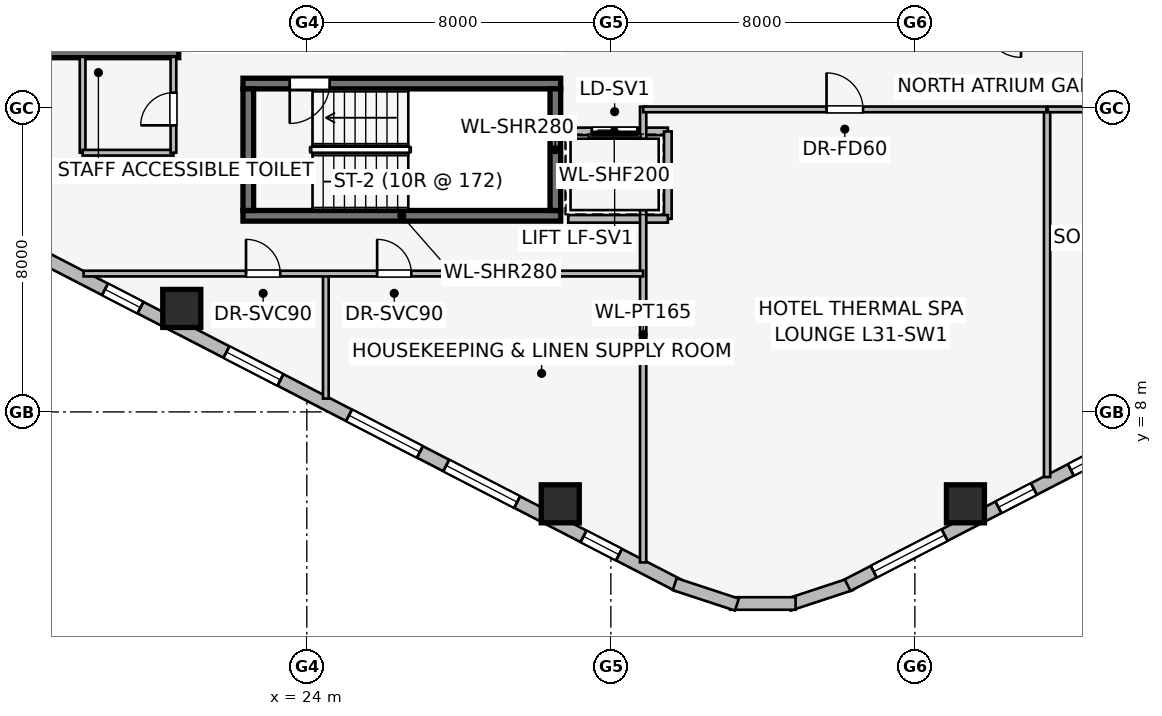
"""IFC4 building model, lengths in metres.
Left out: names, types, materials, properties, quantities, classifications, styles, units other than length and angle.
Written with IfcOpenShell. Run it as: python <this file> out.ifc"""

import sys

from ifc_helpers import new_model, si_unit, direction, frame, frame_2d, origin, origin_2d, place, context, subcontext, project, spatial, rectangle, extrude, element, fill, save


model = new_model("IFC4")
c1 = context("Model", 3, precision=1e-05, world=origin(), true_north=direction((0.0, 1.0)))
c2 = subcontext(c1, "Body", "Model", "MODEL_VIEW")
j1 = project(units=[si_unit("LENGTHUNIT", "METRE"), si_unit("PLANEANGLEUNIT", "RADIAN")], contexts=[c1])
p1 = place(None, origin())
s1 = spatial("IfcSite", under=j1, at=p1, CompositionType="ELEMENT")
p2 = place(p1, origin())
s2 = spatial("IfcBuilding", under=s1, at=p2, CompositionType="ELEMENT")
p3 = place(p2, frame((0.0, 0.0, 118.8)))
s3 = spatial("IfcBuildingStorey", under=s2, at=p3, CompositionType="ELEMENT", Elevation=118.8)
p4 = place(p3, frame((16.87, 17.46, 0.0), z_axis=(0.0, 0.0, 1.0), x_axis=(1.0, 0.0, 0.0)))
e1 = element("IfcWall", 1, at=p4, inside=s3, PredefinedType="SHEAR", context=c2, shape_type="SweptSolid", body=[
    extrude(rectangle(XDim=3.76, YDim=0.28, at=frame_2d((1.88, 0.0))), origin(), (0.0, 0.0, 1.0), 3.45),
])
p5 = place(p3, frame((22.32, 13.16, 0.0), z_axis=(0.0, 0.0, 1.0), x_axis=(1.0, 0.0, 0.0)))
e2 = element("IfcWall", 2, at=p5, inside=s3, PredefinedType="SHEAR", context=c2, shape_type="SweptSolid", body=[
    extrude(rectangle(XDim=8.36, YDim=0.28, at=frame_2d((4.18, 0.0))), origin(), (0.0, 0.0, 1.0), 3.45),
])
p6 = place(p3, frame((30.68, 16.64, 0.0), z_axis=(0.0, 0.0, 1.0), x_axis=(-1.0, 0.0, 0.0)))
e3 = element("IfcWall", 3, at=p6, inside=s3, PredefinedType="SHEAR", context=c2, shape_type="SweptSolid", body=[
    extrude(rectangle(XDim=8.36, YDim=0.28, at=frame_2d((4.18, 0.0))), origin(), (0.0, 0.0, 1.0), 3.45),
])
p7 = place(p6, frame((6.08, 0.0, 0.0)))
e4 = element("IfcOpeningElement", 4, at=p7, cuts=e3, PredefinedType="OPENING", context=c2, shape_type="SweptSolid", body=[
    extrude(rectangle(XDim=1.05, YDim=2.0, at=frame_2d((0.525, 1.0))), frame((0.0, 0.15, 0.0), z_axis=(0.0, -1.0, 0.0), x_axis=(1.0, 0.0, 0.0)), (0.0, 0.0, 1.0), 0.3),
])
for number, where, z_axis, x_axis in (
    (5, (22.46, 16.5, 0.0), (0.0, 0.0, 1.0), (0.0, -1.0, 0.0)),
    (6, (30.54, 13.3, 0.0), (0.0, 0.0, 1.0), (0.0, 1.0, 0.0)),
):
    element("IfcWall", number, at=place(p3, frame(where, z_axis=z_axis, x_axis=x_axis)), inside=s3, PredefinedType="SHEAR", context=c2, shape_type="SweptSolid", body=[
        extrude(rectangle(XDim=3.2, YDim=0.28, at=frame_2d((1.6, 0.0))), origin(), (0.0, 0.0, 1.0), 3.45),
    ])
for number, where, z_axis, x_axis in (
    (7, (20.709, 10.723, 0.0), (0.0, 0.0, 1.0), (1.0, 0.0, 0.0)),
    (8, (30.669, 5.582, 0.0), (0.0, 0.0, 1.0), (1.0, 0.0, 0.0)),
    (9, (41.331, 5.582, 0.0), (0.0, 0.0, 1.0), (1.0, 0.0, 0.0)),
):
    element("IfcColumn", number, at=place(p3, frame(where, z_axis=z_axis, x_axis=x_axis)), inside=s3, PredefinedType="COLUMN", context=c2, shape_type="SweptSolid", body=[
        extrude(rectangle(XDim=1.0, YDim=1.0, at=origin_2d()), origin(), (0.0, 0.0, 1.0), 3.45),
    ])
p8 = place(p3, frame((17.243, 11.95, 0.0), z_axis=(0.0, 0.0, 1.0), x_axis=(-0.790621329885, 0.612305408053, 0.0)))
e10 = element("IfcWall", 10, at=p8, inside=s3, PredefinedType="STANDARD", context=c2, shape_type="SweptSolid", body=[
    extrude(rectangle(XDim=1.676, YDim=0.33, at=frame_2d((0.838, 0.0))), origin(), (0.0, 0.0, 1.0), 3.19),
])
p9 = place(p3, frame((33.769, 3.442, 0.0), z_axis=(0.0, 0.0, 1.0), x_axis=(-0.888613612362, 0.458656568606, 0.0)))
e11 = element("IfcWall", 11, at=p9, inside=s3, PredefinedType="STANDARD", context=c2, shape_type="SweptSolid", body=[
    extrude(rectangle(XDim=18.681, YDim=0.34, at=frame_2d((9.34, 0.0))), origin(), (0.0, 0.0, 1.0), 3.19),
])
p10 = place(p9, frame((1.75, 0.0, 0.75)))
e12 = element("IfcOpeningElement", 12, at=p10, cuts=e11, PredefinedType="OPENING", context=c2, shape_type="SweptSolid", body=[
    extrude(rectangle(XDim=1.05, YDim=1.4, at=frame_2d((0.525, 0.7))), frame((0.0, 0.18, 0.0), z_axis=(0.0, -1.0, 0.0), x_axis=(1.0, 0.0, 0.0)), (0.0, 0.0, 1.0), 0.36),
])
p11 = place(p9, frame((4.765, 0.0, 0.75)))
e13 = element("IfcOpeningElement", 13, at=p11, cuts=e11, PredefinedType="OPENING", context=c2, shape_type="SweptSolid", body=[
    extrude(rectangle(XDim=2.1, YDim=1.5, at=frame_2d((1.05, 0.75))), frame((0.0, 0.18, 0.0), z_axis=(0.0, -1.0, 0.0), x_axis=(1.0, 0.0, 0.0)), (0.0, 0.0, 1.0), 0.36),
])
p12 = place(p9, frame((7.644, 0.0, 0.75)))
e14 = element("IfcOpeningElement", 14, at=p12, cuts=e11, PredefinedType="OPENING", context=c2, shape_type="SweptSolid", body=[
    extrude(rectangle(XDim=2.1, YDim=1.5, at=frame_2d((1.05, 0.75))), frame((0.0, 0.18, 0.0), z_axis=(0.0, -1.0, 0.0), x_axis=(1.0, 0.0, 0.0)), (0.0, 0.0, 1.0), 0.36),
])
p13 = place(p9, frame((11.774, 0.0, 0.75)))
e15 = element("IfcOpeningElement", 15, at=p13, cuts=e11, PredefinedType="OPENING", context=c2, shape_type="SweptSolid", body=[
    extrude(rectangle(XDim=1.6, YDim=1.55, at=frame_2d((0.8, 0.775))), frame((0.0, 0.18, 0.0), z_axis=(0.0, -1.0, 0.0), x_axis=(1.0, 0.0, 0.0)), (0.0, 0.0, 1.0), 0.36),
])
p14 = place(p9, frame((15.92, 0.0, 0.75)))
e16 = element("IfcOpeningElement", 16, at=p14, cuts=e11, PredefinedType="OPENING", context=c2, shape_type="SweptSolid", body=[
    extrude(rectangle(XDim=1.05, YDim=1.4, at=frame_2d((0.525, 0.7))), frame((0.0, 0.18, 0.0), z_axis=(0.0, -1.0, 0.0), x_axis=(1.0, 0.0, 0.0)), (0.0, 0.0, 1.0), 0.36),
])
for number, where, z_axis, x_axis in (
    (17, (38.319, 3.468, 0.0), (0.0, 0.0, 1.0), (-0.95, -0.312, 0.0)),
    (18, (36.861, 2.959, 0.0), (0.0, 0.0, 1.0), (-1.0, 0.0, 0.0)),
    (19, (35.317, 2.93, 0.0), (0.0, 0.0, 1.0), (-0.95, 0.312, 0.0)),
):
    element("IfcWall", number, at=place(p3, frame(where, z_axis=z_axis, x_axis=x_axis)), inside=s3, PredefinedType="STANDARD", context=c2, shape_type="SweptSolid", body=[
        extrude(rectangle(XDim=1.722, YDim=0.33, at=frame_2d((0.861, 0.0))), origin(), (0.0, 0.0, 1.0), 3.19),
    ])
p15 = place(p3, frame((54.831, 12.01, 0.0), z_axis=(0.0, 0.0, 1.0), x_axis=(-0.888613612362, -0.458656568606, 0.0)))
e20 = element("IfcWall", 20, at=p15, inside=s3, PredefinedType="STANDARD", context=c2, shape_type="SweptSolid", body=[
    extrude(rectangle(XDim=18.681, YDim=0.34, at=frame_2d((9.34, 0.0))), origin(), (0.0, 0.0, 1.0), 3.19),
])
p16 = place(p15, frame((1.023, 0.0, 0.75)))
e21 = element("IfcOpeningElement", 21, at=p16, cuts=e20, PredefinedType="OPENING", context=c2, shape_type="SweptSolid", body=[
    extrude(rectangle(XDim=1.6, YDim=1.55, at=frame_2d((0.8, 0.775))), frame((0.0, 0.18, 0.0), z_axis=(0.0, -1.0, 0.0), x_axis=(1.0, 0.0, 0.0)), (0.0, 0.0, 1.0), 0.36),
])
p17 = place(p15, frame((4.655, 0.0, 0.75)))
e22 = element("IfcOpeningElement", 22, at=p17, cuts=e20, PredefinedType="OPENING", context=c2, shape_type="SweptSolid", body=[
    extrude(rectangle(XDim=2.1, YDim=1.5, at=frame_2d((1.05, 0.75))), frame((0.0, 0.18, 0.0), z_axis=(0.0, -1.0, 0.0), x_axis=(1.0, 0.0, 0.0)), (0.0, 0.0, 1.0), 0.36),
])
p18 = place(p15, frame((7.313, 0.0, 0.75)))
e23 = element("IfcOpeningElement", 23, at=p18, cuts=e20, PredefinedType="OPENING", context=c2, shape_type="SweptSolid", body=[
    extrude(rectangle(XDim=2.1, YDim=1.5, at=frame_2d((1.05, 0.75))), frame((0.0, 0.18, 0.0), z_axis=(0.0, -1.0, 0.0), x_axis=(1.0, 0.0, 0.0)), (0.0, 0.0, 1.0), 0.36),
])
p19 = place(p15, frame((9.971, 0.0, 0.75)))
e24 = element("IfcOpeningElement", 24, at=p19, cuts=e20, PredefinedType="OPENING", context=c2, shape_type="SweptSolid", body=[
    extrude(rectangle(XDim=2.1, YDim=1.5, at=frame_2d((1.05, 0.75))), frame((0.0, 0.18, 0.0), z_axis=(0.0, -1.0, 0.0), x_axis=(1.0, 0.0, 0.0)), (0.0, 0.0, 1.0), 0.36),
])
p20 = place(p15, frame((13.165, 0.0, 0.75)))
e25 = element("IfcOpeningElement", 25, at=p20, cuts=e20, PredefinedType="OPENING", context=c2, shape_type="SweptSolid", body=[
    extrude(rectangle(XDim=1.05, YDim=1.4, at=frame_2d((0.525, 0.7))), frame((0.0, 0.18, 0.0), z_axis=(0.0, -1.0, 0.0), x_axis=(1.0, 0.0, 0.0)), (0.0, 0.0, 1.0), 0.36),
])
p21 = place(p15, frame((15.808, 0.0, 0.75)))
e26 = element("IfcOpeningElement", 26, at=p21, cuts=e20, PredefinedType="OPENING", context=c2, shape_type="SweptSolid", body=[
    extrude(rectangle(XDim=2.1, YDim=1.5, at=frame_2d((1.05, 0.75))), frame((0.0, 0.18, 0.0), z_axis=(0.0, -1.0, 0.0), x_axis=(1.0, 0.0, 0.0)), (0.0, 0.0, 1.0), 0.36),
])
p22 = place(p3, frame((33.5, 15.38, 0.0), z_axis=(0.0, 0.0, 1.0), x_axis=(-1.0, 0.0, 0.0)))
e27 = element("IfcWall", 27, at=p22, inside=s3, PredefinedType="PARTITIONING", context=c2, shape_type="SweptSolid", body=[
    extrude(rectangle(XDim=2.82, YDim=0.2, at=frame_2d((1.41, 0.0))), origin(), (0.0, 0.0, 1.0), 3.19),
])
p23 = place(p22, frame((0.8, 0.0, 0.0)))
e28 = element("IfcOpeningElement", 28, at=p23, cuts=e27, PredefinedType="OPENING", context=c2, shape_type="SweptSolid", body=[
    extrude(rectangle(XDim=1.2, YDim=2.2, at=frame_2d((0.6, 1.1))), frame((0.0, 0.11, 0.0), z_axis=(0.0, -1.0, 0.0), x_axis=(1.0, 0.0, 0.0)), (0.0, 0.0, 1.0), 0.22),
])
p24 = place(p3, frame((33.5, 13.08, 0.0), z_axis=(0.0, 0.0, 1.0), x_axis=(0.0, 1.0, 0.0)))
e29 = element("IfcWall", 29, at=p24, inside=s3, PredefinedType="PARTITIONING", context=c2, shape_type="SweptSolid", body=[
    extrude(rectangle(XDim=2.3, YDim=0.2, at=frame_2d((1.15, 0.0))), origin(), (0.0, 0.0, 1.0), 3.19),
])
p25 = place(p3, frame((30.879, 13.08, 0.0), z_axis=(0.0, 0.0, 1.0), x_axis=(1.0, 0.0, 0.0)))
e30 = element("IfcWall", 30, at=p25, inside=s3, PredefinedType="PARTITIONING", context=c2, shape_type="SweptSolid", body=[
    extrude(rectangle(XDim=2.621, YDim=0.2, at=frame_2d((1.311, 0.0))), origin(), (0.0, 0.0, 1.0), 3.19),
])
p26 = place(p3, frame((18.1, 17.34, 0.0), z_axis=(0.0, 0.0, 1.0), x_axis=(0.0, -1.0, 0.0)))
e31 = element("IfcWall", 31, at=p26, inside=s3, PredefinedType="PARTITIONING", context=c2, shape_type="SweptSolid", body=[
    extrude(rectangle(XDim=2.52, YDim=0.15, at=frame_2d((1.26, 0.0))), origin(), (0.0, 0.0, 1.0), 3.19),
])
p27 = place(p3, frame((18.1, 14.82, 0.0), z_axis=(0.0, 0.0, 1.0), x_axis=(1.0, 0.0, 0.0)))
e32 = element("IfcWall", 32, at=p27, inside=s3, PredefinedType="PARTITIONING", context=c2, shape_type="SweptSolid", body=[
    extrude(rectangle(XDim=2.39, YDim=0.15, at=frame_2d((1.195, 0.0))), origin(), (0.0, 0.0, 1.0), 3.19),
])
p28 = place(p3, frame((20.49, 14.82, 0.0), z_axis=(0.0, 0.0, 1.0), x_axis=(0.0, 1.0, 0.0)))
e33 = element("IfcWall", 33, at=p28, inside=s3, PredefinedType="PARTITIONING", context=c2, shape_type="SweptSolid", body=[
    extrude(rectangle(XDim=2.52, YDim=0.15, at=frame_2d((1.26, 0.0))), origin(), (0.0, 0.0, 1.0), 3.19),
])
p29 = place(p28, frame((0.72, 0.0, 0.0)))
e34 = element("IfcOpeningElement", 34, at=p29, cuts=e33, PredefinedType="OPENING", context=c2, shape_type="SweptSolid", body=[
    extrude(rectangle(XDim=0.86, YDim=2.0, at=frame_2d((0.43, 1.0))), frame((0.0, 0.085, 0.0), z_axis=(0.0, -1.0, 0.0), x_axis=(1.0, 0.0, 0.0)), (0.0, 0.0, 1.0), 0.17),
])
p30 = place(p3, frame((32.85, 4.04, 0.0), z_axis=(0.0, 0.0, 1.0), x_axis=(0.0, 1.0, 0.0)))
e35 = element("IfcWall", 35, at=p30, inside=s3, PredefinedType="PARTITIONING", context=c2, shape_type="SweptSolid", body=[
    extrude(rectangle(XDim=11.99, YDim=0.165, at=frame_2d((5.995, 0.0))), origin(), (0.0, 0.0, 1.0), 3.19),
])
p31 = place(p3, frame((24.5, 8.35, 0.0), z_axis=(0.0, 0.0, 1.0), x_axis=(0.0, 1.0, 0.0)))
e36 = element("IfcWall", 36, at=p31, inside=s3, PredefinedType="PARTITIONING", context=c2, shape_type="SweptSolid", body=[
    extrude(rectangle(XDim=3.29, YDim=0.15, at=frame_2d((1.645, 0.0))), origin(), (0.0, 0.0, 1.0), 3.19),
])
p32 = place(p3, frame((18.126, 11.64, 0.0), z_axis=(0.0, 0.0, 1.0), x_axis=(1.0, 0.0, 0.0)))
e37 = element("IfcWall", 37, at=p32, inside=s3, PredefinedType="PARTITIONING", context=c2, shape_type="SweptSolid", body=[
    extrude(rectangle(XDim=14.724, YDim=0.15, at=frame_2d((7.362, 0.0))), origin(), (0.0, 0.0, 1.0), 3.19),
])
p33 = place(p32, frame((4.274, 0.0, 0.0)))
e38 = element("IfcOpeningElement", 38, at=p33, cuts=e37, PredefinedType="OPENING", context=c2, shape_type="SweptSolid", body=[
    extrude(rectangle(XDim=0.9, YDim=2.0, at=frame_2d((0.45, 1.0))), frame((0.0, 0.085, 0.0), z_axis=(0.0, -1.0, 0.0), x_axis=(1.0, 0.0, 0.0)), (0.0, 0.0, 1.0), 0.17),
])
p34 = place(p32, frame((7.724, 0.0, 0.0)))
e39 = element("IfcOpeningElement", 39, at=p34, cuts=e37, PredefinedType="OPENING", context=c2, shape_type="SweptSolid", body=[
    extrude(rectangle(XDim=0.9, YDim=2.0, at=frame_2d((0.45, 1.0))), frame((0.0, 0.085, 0.0), z_axis=(0.0, -1.0, 0.0), x_axis=(1.0, 0.0, 0.0)), (0.0, 0.0, 1.0), 0.17),
])
p35 = place(p3, frame((43.479, 6.286, 0.0), z_axis=(0.0, 0.0, 1.0), x_axis=(0.0, 1.0, 0.0)))
e40 = element("IfcWall", 40, at=p35, inside=s3, PredefinedType="PARTITIONING", context=c2, shape_type="SweptSolid", body=[
    extrude(rectangle(XDim=9.644, YDim=0.165, at=frame_2d((4.822, 0.0))), origin(), (0.0, 0.0, 1.0), 3.19),
])
p36 = place(p3, frame((32.85, 15.96, 0.0), z_axis=(0.0, 0.0, 1.0), x_axis=(1.0, 0.0, 0.0)))
e41 = element("IfcWall", 41, at=p36, inside=s3, PredefinedType="PARTITIONING", context=c2, shape_type="SweptSolid", body=[
    extrude(rectangle(XDim=10.611, YDim=0.15, at=frame_2d((5.305, 0.0))), origin(), (0.0, 0.0, 1.0), 3.19),
])
p37 = place(p36, frame((4.826, 0.0, 0.0)))
e42 = element("IfcOpeningElement", 42, at=p37, cuts=e41, PredefinedType="OPENING", context=c2, shape_type="SweptSolid", body=[
    extrude(rectangle(XDim=0.96, YDim=2.0, at=frame_2d((0.48, 1.0))), frame((0.0, 0.085, 0.0), z_axis=(0.0, -1.0, 0.0), x_axis=(1.0, 0.0, 0.0)), (0.0, 0.0, 1.0), 0.17),
])
p38 = place(p3, frame((43.497, 15.96, 0.0), z_axis=(0.0, 0.0, 1.0), x_axis=(1.0, 0.0, 0.0)))
e43 = element("IfcWall", 43, at=p38, inside=s3, PredefinedType="PARTITIONING", context=c2, shape_type="SweptSolid", body=[
    extrude(rectangle(XDim=13.711, YDim=0.15, at=frame_2d((6.855, 0.0))), origin(), (0.0, 0.0, 1.0), 3.19),
])
p39 = place(p38, frame((6.389, 0.0, 0.0)))
e44 = element("IfcOpeningElement", 44, at=p39, cuts=e43, PredefinedType="OPENING", context=c2, shape_type="SweptSolid", body=[
    extrude(rectangle(XDim=0.96, YDim=2.0, at=frame_2d((0.48, 1.0))), frame((0.0, 0.085, 0.0), z_axis=(0.0, -1.0, 0.0), x_axis=(1.0, 0.0, 0.0)), (0.0, 0.0, 1.0), 0.17),
])
p40 = place(p10, origin())
e45 = element("IfcWindow", 45, at=p40, inside=s3, PartitioningType="SINGLE_PANEL", PredefinedType="WINDOW", context=c2, shape_type="SweptSolid", body=[
    extrude(rectangle(XDim=1.05, YDim=1.4, at=frame_2d((0.525, 0.7))), frame((0.0, 0.03, 0.0), z_axis=(0.0, -1.0, 0.0), x_axis=(1.0, 0.0, 0.0)), (0.0, 0.0, 1.0), 0.06),
])
fill(e12, e45)
p41 = place(p11, origin())
e46 = element("IfcWindow", 46, at=p41, inside=s3, PartitioningType="SINGLE_PANEL", PredefinedType="WINDOW", context=c2, shape_type="SweptSolid", body=[
    extrude(rectangle(XDim=2.1, YDim=1.5, at=frame_2d((1.05, 0.75))), frame((0.0, 0.03, 0.0), z_axis=(0.0, -1.0, 0.0), x_axis=(1.0, 0.0, 0.0)), (0.0, 0.0, 1.0), 0.06),
])
fill(e13, e46)
p42 = place(p12, origin())
e47 = element("IfcWindow", 47, at=p42, inside=s3, PartitioningType="SINGLE_PANEL", PredefinedType="WINDOW", context=c2, shape_type="SweptSolid", body=[
    extrude(rectangle(XDim=2.1, YDim=1.5, at=frame_2d((1.05, 0.75))), frame((0.0, 0.03, 0.0), z_axis=(0.0, -1.0, 0.0), x_axis=(1.0, 0.0, 0.0)), (0.0, 0.0, 1.0), 0.06),
])
fill(e14, e47)
p43 = place(p13, origin())
e48 = element("IfcWindow", 48, at=p43, inside=s3, PartitioningType="SINGLE_PANEL", PredefinedType="WINDOW", context=c2, shape_type="SweptSolid", body=[
    extrude(rectangle(XDim=1.6, YDim=1.55, at=frame_2d((0.8, 0.775))), frame((0.0, 0.03, 0.0), z_axis=(0.0, -1.0, 0.0), x_axis=(1.0, 0.0, 0.0)), (0.0, 0.0, 1.0), 0.06),
])
fill(e15, e48)
p44 = place(p14, origin())
e49 = element("IfcWindow", 49, at=p44, inside=s3, PartitioningType="SINGLE_PANEL", PredefinedType="WINDOW", context=c2, shape_type="SweptSolid", body=[
    extrude(rectangle(XDim=1.05, YDim=1.4, at=frame_2d((0.525, 0.7))), frame((0.0, 0.03, 0.0), z_axis=(0.0, -1.0, 0.0), x_axis=(1.0, 0.0, 0.0)), (0.0, 0.0, 1.0), 0.06),
])
fill(e16, e49)
p45 = place(p19, origin())
e50 = element("IfcWindow", 50, at=p45, inside=s3, PartitioningType="SINGLE_PANEL", PredefinedType="WINDOW", context=c2, shape_type="SweptSolid", body=[
    extrude(rectangle(XDim=2.1, YDim=1.5, at=frame_2d((1.05, 0.75))), frame((0.0, 0.03, 0.0), z_axis=(0.0, -1.0, 0.0), x_axis=(1.0, 0.0, 0.0)), (0.0, 0.0, 1.0), 0.06),
])
fill(e24, e50)
p46 = place(p20, origin())
e51 = element("IfcWindow", 51, at=p46, inside=s3, PartitioningType="SINGLE_PANEL", PredefinedType="WINDOW", context=c2, shape_type="SweptSolid", body=[
    extrude(rectangle(XDim=1.05, YDim=1.4, at=frame_2d((0.525, 0.7))), frame((0.0, 0.03, 0.0), z_axis=(0.0, -1.0, 0.0), x_axis=(1.0, 0.0, 0.0)), (0.0, 0.0, 1.0), 0.06),
])
fill(e25, e51)
p47 = place(p21, origin())
e52 = element("IfcWindow", 52, at=p47, inside=s3, PartitioningType="SINGLE_PANEL", PredefinedType="WINDOW", context=c2, shape_type="SweptSolid", body=[
    extrude(rectangle(XDim=2.1, YDim=1.5, at=frame_2d((1.05, 0.75))), frame((0.0, 0.03, 0.0), z_axis=(0.0, -1.0, 0.0), x_axis=(1.0, 0.0, 0.0)), (0.0, 0.0, 1.0), 0.06),
])
fill(e26, e52)
p48 = place(p7, origin())
e53 = element("IfcDoor", 53, at=p48, inside=s3, OperationType="SINGLE_SWING_RIGHT", PredefinedType="DOOR", context=c2, shape_type="SweptSolid", body=[
    extrude(rectangle(XDim=1.05, YDim=2.0, at=frame_2d((0.525, 1.0))), frame((0.0, 0.025, 0.0), z_axis=(0.0, -1.0, 0.0), x_axis=(1.0, 0.0, 0.0)), (0.0, 0.0, 1.0), 0.05),
])
fill(e4, e53)
p49 = place(p23, origin())
e54 = element("IfcDoor", 54, at=p49, inside=s3, OperationType="SLIDING_TO_RIGHT", PredefinedType="DOOR", context=c2, shape_type="SweptSolid", body=[
    extrude(rectangle(XDim=1.2, YDim=2.2, at=frame_2d((0.6, 1.1))), frame((0.0, 0.025, 0.0), z_axis=(0.0, -1.0, 0.0), x_axis=(1.0, 0.0, 0.0)), (0.0, 0.0, 1.0), 0.05),
])
fill(e28, e54)
p50 = place(p29, origin())
e55 = element("IfcDoor", 55, at=p50, inside=s3, OperationType="SINGLE_SWING_LEFT", PredefinedType="DOOR", context=c2, shape_type="SweptSolid", body=[
    extrude(rectangle(XDim=0.86, YDim=2.0, at=frame_2d((0.43, 1.0))), frame((0.0, 0.025, 0.0), z_axis=(0.0, -1.0, 0.0), x_axis=(1.0, 0.0, 0.0)), (0.0, 0.0, 1.0), 0.05),
])
fill(e34, e55)
p51 = place(p33, origin())
e56 = element("IfcDoor", 56, at=p51, inside=s3, OperationType="SINGLE_SWING_LEFT", PredefinedType="DOOR", context=c2, shape_type="SweptSolid", body=[
    extrude(rectangle(XDim=0.9, YDim=2.0, at=frame_2d((0.45, 1.0))), frame((0.0, 0.025, 0.0), z_axis=(0.0, -1.0, 0.0), x_axis=(1.0, 0.0, 0.0)), (0.0, 0.0, 1.0), 0.05),
])
fill(e38, e56)
p52 = place(p34, origin())
e57 = element("IfcDoor", 57, at=p52, inside=s3, OperationType="SINGLE_SWING_LEFT", PredefinedType="DOOR", context=c2, shape_type="SweptSolid", body=[
    extrude(rectangle(XDim=0.9, YDim=2.0, at=frame_2d((0.45, 1.0))), frame((0.0, 0.025, 0.0), z_axis=(0.0, -1.0, 0.0), x_axis=(1.0, 0.0, 0.0)), (0.0, 0.0, 1.0), 0.05),
])
fill(e39, e57)
p53 = place(p37, origin())
e58 = element("IfcDoor", 58, at=p53, inside=s3, OperationType="SINGLE_SWING_LEFT", PredefinedType="DOOR", context=c2, shape_type="SweptSolid", body=[
    extrude(rectangle(XDim=0.96, YDim=2.0, at=frame_2d((0.48, 1.0))), frame((0.0, 0.025, 0.0), z_axis=(0.0, -1.0, 0.0), x_axis=(1.0, 0.0, 0.0)), (0.0, 0.0, 1.0), 0.05),
])
fill(e42, e58)
save(model, sys.argv[1])
